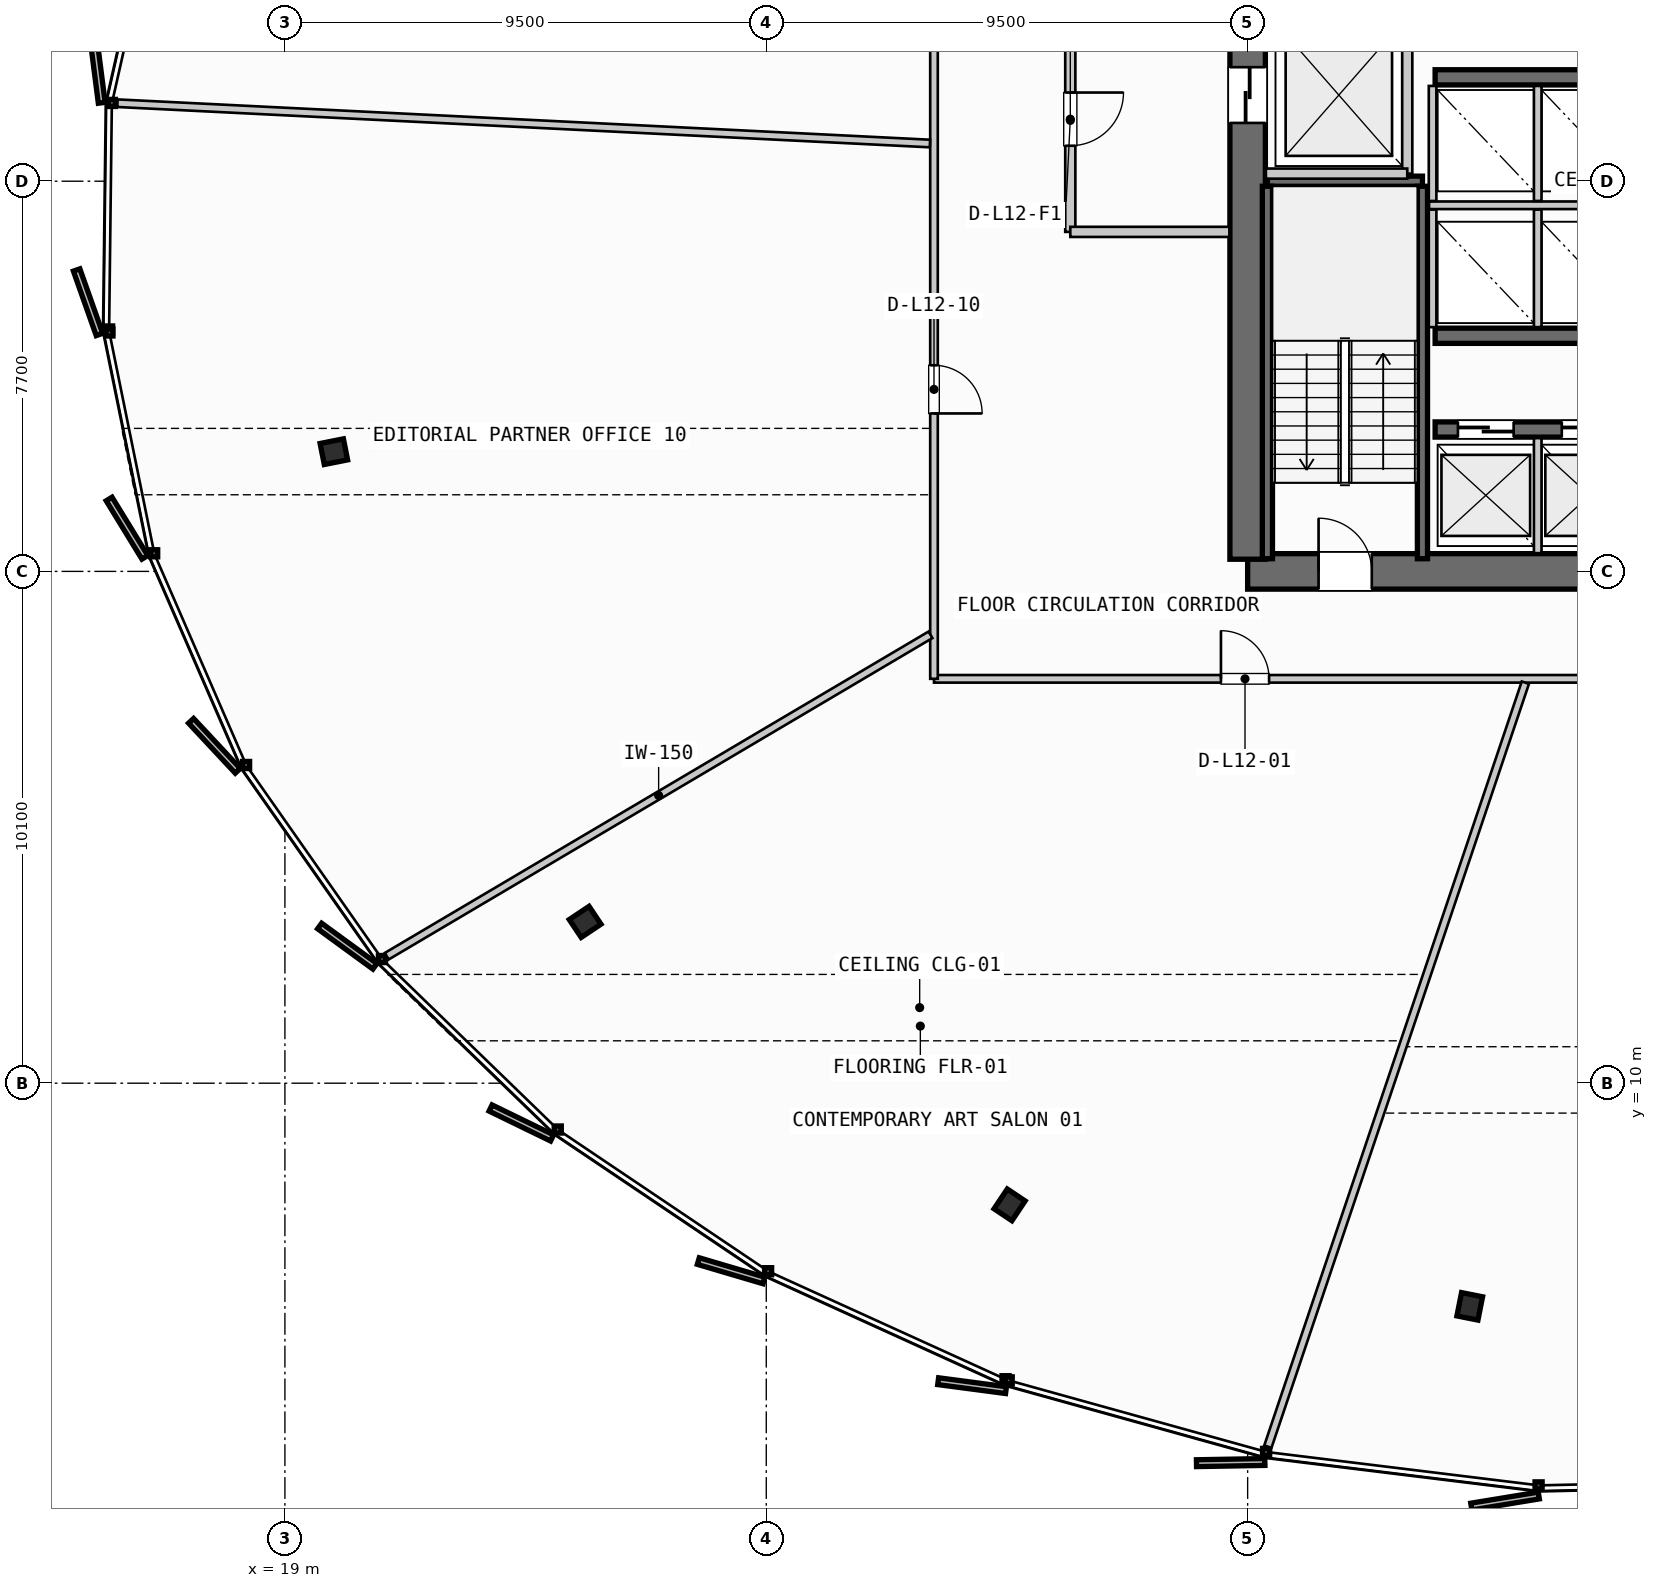
"""IFC4 building model, lengths in metres.
Left out: names, types, materials, properties, quantities, classifications, styles, units other than length and angle.
Written with IfcOpenShell. Run it as: python <this file> out.ifc"""

import sys

from ifc_helpers import new_model, si_unit, direction, frame, frame_2d, origin, origin_2d, place, context, subcontext, project, spatial, rectangle, i_section, extrude, source, transform, mapped, element, fill, save


model = new_model("IFC4")
c1 = context("Model", 3, precision=1e-05, world=origin(), true_north=direction((0.0, 1.0)))
c2 = subcontext(c1, "Body", "Model", "MODEL_VIEW")
j1 = project(units=[si_unit("LENGTHUNIT", "METRE"), si_unit("PLANEANGLEUNIT", "RADIAN")], contexts=[c1])
p1 = place(None, origin())
s1 = spatial("IfcSite", under=j1, at=p1, CompositionType="ELEMENT")
p2 = place(p1, origin())
s2 = spatial("IfcBuilding", under=s1, at=p2, CompositionType="ELEMENT")
p3 = place(p2, frame((0.0, 0.0, 52.4)))
s3 = spatial("IfcBuildingStorey", under=s2, at=p3, CompositionType="ELEMENT", Elevation=52.4)
p4 = place(p3, frame((38.0, 20.1, 0.0), z_axis=(0.0, 0.0, 1.0), x_axis=(1.0, 0.0, 0.0)))
e1 = element("IfcWall", 1, at=p4, inside=s3, PredefinedType="SHEAR", context=c2, shape_type="SweptSolid", body=[
    extrude(rectangle(XDim=17.6, YDim=0.7, at=frame_2d((8.8, 0.0))), origin(), (0.0, 0.0, 1.0), 3.55),
])
p5 = place(p4, frame((1.4, 0.0, 0.0)))
e2 = element("IfcOpeningElement", 2, at=p5, cuts=e1, PredefinedType="OPENING", context=c2, shape_type="SweptSolid", body=[
    extrude(rectangle(XDim=1.05, YDim=2.15, at=frame_2d((0.525, 1.075))), frame((0.0, 0.36, 0.0), z_axis=(0.0, -1.0, 0.0), x_axis=(1.0, 0.0, 0.0)), (0.0, 0.0, 1.0), 0.72),
])
p6 = place(p4, frame((15.15, 0.0, 0.0)))
e3 = element("IfcOpeningElement", 3, at=p6, cuts=e1, PredefinedType="OPENING", context=c2, shape_type="SweptSolid", body=[
    extrude(rectangle(XDim=1.05, YDim=2.15, at=frame_2d((0.525, 1.075))), frame((0.0, 0.36, 0.0), z_axis=(0.0, -1.0, 0.0), x_axis=(1.0, 0.0, 0.0)), (0.0, 0.0, 1.0), 0.72),
])
p7 = place(p3, frame((38.0, 35.26, 0.0), z_axis=(0.0, 0.0, 1.0), x_axis=(0.0, -1.0, 0.0)))
e4 = element("IfcWall", 4, at=p7, inside=s3, PredefinedType="SHEAR", context=c2, shape_type="SweptSolid", body=[
    extrude(rectangle(XDim=14.92, YDim=0.7, at=frame_2d((7.46, 0.0))), origin(), (0.0, 0.0, 1.0), 3.55),
])
p8 = place(p7, frame((5.21, 0.0, 0.0)))
e5 = element("IfcOpeningElement", 5, at=p8, cuts=e4, PredefinedType="OPENING", context=c2, shape_type="SweptSolid", body=[
    extrude(rectangle(XDim=1.1, YDim=2.2, at=frame_2d((0.55, 1.1))), frame((0.0, 0.36, 0.0), z_axis=(0.0, -1.0, 0.0), x_axis=(1.0, 0.0, 0.0)), (0.0, 0.0, 1.0), 0.72),
])
p9 = place(p3, frame((41.7, 22.9, 0.0), z_axis=(0.0, 0.0, 1.0), x_axis=(1.0, 0.0, 0.0)))
e6 = element("IfcWall", 6, at=p9, inside=s3, PredefinedType="SHEAR", context=c2, shape_type="SweptSolid", body=[
    extrude(rectangle(XDim=4.25, YDim=0.3, at=frame_2d((2.125, 0.0))), origin(), (0.0, 0.0, 1.0), 3.55),
])
p10 = place(p9, frame((0.45, 0.0, 0.0)))
e7 = element("IfcOpeningElement", 7, at=p10, cuts=e6, PredefinedType="OPENING", context=c2, shape_type="SweptSolid", body=[
    extrude(rectangle(XDim=1.1, YDim=2.2, at=frame_2d((0.55, 1.1))), frame((0.0, 0.16, 0.0), z_axis=(0.0, -1.0, 0.0), x_axis=(1.0, 0.0, 0.0)), (0.0, 0.0, 1.0), 0.32),
])
p11 = place(p9, frame((2.5, 0.0, 0.0)))
e8 = element("IfcOpeningElement", 8, at=p11, cuts=e6, PredefinedType="OPENING", context=c2, shape_type="SweptSolid", body=[
    extrude(rectangle(XDim=1.1, YDim=2.2, at=frame_2d((0.55, 1.1))), frame((0.0, 0.16, 0.0), z_axis=(0.0, -1.0, 0.0), x_axis=(1.0, 0.0, 0.0)), (0.0, 0.0, 1.0), 0.32),
])
for number, where, z_axis, x_axis in (
    (9, (41.7, 24.75, 0.0), (0.0, 0.0, 1.0), (1.0, 0.0, 0.0)),
    (10, (41.7, 29.85, 0.0), (0.0, 0.0, 1.0), (1.0, 0.0, 0.0)),
):
    element("IfcWall", number, at=place(p3, frame(where, z_axis=z_axis, x_axis=x_axis)), inside=s3, PredefinedType="SHEAR", context=c2, shape_type="SweptSolid", body=[
        extrude(rectangle(XDim=4.25, YDim=0.3, at=frame_2d((2.125, 0.0))), origin(), (0.0, 0.0, 1.0), 3.55),
    ])
m1 = source(origin(), c2, "Body", "SweptSolid", [
    extrude(i_section(OverallWidth=0.423, OverallDepth=0.469, WebThickness=0.051, FlangeThickness=0.081, FilletRadius=0.015, at=origin_2d()), origin(), (0.0, 0.0, 1.0), 3.55),
])
for number, where, z_axis, x_axis in (
    (11, (19.966, 22.462, 0.0), (0.0, 0.0, 1.0), (-0.981, -0.195, 0.0)),
    (12, (24.925, 13.183, 0.0), (0.0, 0.0, 1.0), (-0.831, -0.556, 0.0)),
    (13, (33.302, 7.599, 0.0), (0.0, 0.0, 1.0), (-0.556, -0.831, 0.0)),
    (14, (42.383, 5.596, 0.0), (0.0, 0.0, 1.0), (-0.195, -0.981, 0.0)),
):
    element("IfcColumn", number, at=place(p3, frame(where, z_axis=z_axis, x_axis=x_axis)), inside=s3, PredefinedType="COLUMN", context=c2, shape_type="MappedRepresentation", body=[
        mapped(m1, transform((0.0, 0.0, 0.0), scale=1.0)),
    ])
p12 = place(p3, frame((38.39, 27.8, 0.0), z_axis=(0.0, 0.0, 1.0), x_axis=(1.0, 0.0, 0.0)))
e15 = element("IfcWall", 15, at=p12, inside=s3, PredefinedType="SHEAR", context=c2, shape_type="SweptSolid", body=[
    extrude(rectangle(XDim=3.06, YDim=0.2, at=frame_2d((1.53, 0.0))), origin(), (0.0, 0.0, 1.0), 3.55),
])
for number, where, z_axis, x_axis in (
    (16, (41.45, 27.7, 0.0), (0.0, 0.0, 1.0), (0.0, -1.0, 0.0)),
    (17, (38.39, 20.35, 0.0), (0.0, 0.0, 1.0), (0.0, 1.0, 0.0)),
):
    element("IfcWall", number, at=place(p3, frame(where, z_axis=z_axis, x_axis=x_axis)), inside=s3, PredefinedType="SHEAR", context=c2, shape_type="SweptSolid", body=[
        extrude(rectangle(XDim=7.35, YDim=0.2, at=frame_2d((3.675, 0.0))), origin(), (0.0, 0.0, 1.0), 3.55),
    ])
p13 = place(p3, frame((41.15, 27.95, 0.0), z_axis=(0.0, 0.0, 1.0), x_axis=(0.0, 1.0, 0.0)))
e18 = element("IfcWall", 18, at=p13, inside=s3, PredefinedType="PARTITIONING", context=c2, shape_type="SweptSolid", body=[
    extrude(rectangle(XDim=3.1, YDim=0.2, at=frame_2d((1.55, 0.0))), origin(), (0.0, 0.0, 1.0), 2.645),
])
p14 = place(p3, frame((38.36, 27.95, 0.0), z_axis=(0.0, 0.0, 1.0), x_axis=(1.0, 0.0, 0.0)))
e19 = element("IfcWall", 19, at=p14, inside=s3, PredefinedType="PARTITIONING", context=c2, shape_type="SweptSolid", body=[
    extrude(rectangle(XDim=2.79, YDim=0.2, at=frame_2d((1.395, 0.0))), origin(), (0.0, 0.0, 1.0), 2.645),
])
p15 = place(p3, frame((34.5, 31.2, 0.0), z_axis=(0.0, 0.0, 1.0), x_axis=(0.0, -1.0, 0.0)))
e20 = element("IfcWall", 20, at=p15, inside=s3, PredefinedType="PARTITIONING", context=c2, shape_type="SweptSolid", body=[
    extrude(rectangle(XDim=4.4, YDim=0.2, at=frame_2d((2.2, 0.0))), origin(), (0.0, 0.0, 1.0), 2.645),
])
p16 = place(p15, frame((1.65, 0.0, 0.0)))
e21 = element("IfcOpeningElement", 21, at=p16, cuts=e20, PredefinedType="OPENING", context=c2, shape_type="SweptSolid", body=[
    extrude(rectangle(XDim=1.05, YDim=2.15, at=frame_2d((0.525, 1.075))), frame((0.0, 0.11, 0.0), z_axis=(0.0, -1.0, 0.0), x_axis=(1.0, 0.0, 0.0)), (0.0, 0.0, 1.0), 0.22),
])
p17 = place(p3, frame((34.5, 26.8, 0.0), z_axis=(0.0, 0.0, 1.0), x_axis=(1.0, 0.0, 0.0)))
e22 = element("IfcWall", 22, at=p17, inside=s3, PredefinedType="PARTITIONING", context=c2, shape_type="SweptSolid", body=[
    extrude(rectangle(XDim=3.14, YDim=0.2, at=frame_2d((1.57, 0.0))), origin(), (0.0, 0.0, 1.0), 2.645),
])
p18 = place(p3, frame((43.725, 20.46, 0.0), z_axis=(0.0, 0.0, 1.0), x_axis=(0.0, 1.0, 0.0)))
e23 = element("IfcWall", 23, at=p18, inside=s3, PredefinedType="PARTITIONING", context=c2, shape_type="SweptSolid", body=[
    extrude(rectangle(XDim=2.27, YDim=0.15, at=frame_2d((1.135, 0.0))), origin(), (0.0, 0.0, 1.0), 2.645),
])
p19 = place(p3, frame((41.58, 27.325, 0.0), z_axis=(0.0, 0.0, 1.0), x_axis=(1.0, 0.0, 0.0)))
e24 = element("IfcWall", 24, at=p19, inside=s3, PredefinedType="PARTITIONING", context=c2, shape_type="SweptSolid", body=[
    extrude(rectangle(XDim=4.32, YDim=0.15, at=frame_2d((2.16, 0.0))), origin(), (0.0, 0.0, 1.0), 2.645),
])
for number, where, z_axis, x_axis in (
    (25, (41.65, 24.92, 0.0), (0.0, 0.0, 1.0), (0.0, 1.0, 0.0)),
    (26, (43.725, 24.92, 0.0), (0.0, 0.0, 1.0), (0.0, 1.0, 0.0)),
):
    element("IfcWall", number, at=place(p3, frame(where, z_axis=z_axis, x_axis=x_axis)), inside=s3, PredefinedType="PARTITIONING", context=c2, shape_type="SweptSolid", body=[
        extrude(rectangle(XDim=2.32, YDim=0.15, at=frame_2d((1.16, 0.0))), origin(), (0.0, 0.0, 1.0), 2.645),
    ])
for number, where, z_axis, x_axis in (
    (27, (41.65, 27.41, 0.0), (0.0, 0.0, 1.0), (0.0, 1.0, 0.0)),
    (28, (43.725, 27.41, 0.0), (0.0, 0.0, 1.0), (0.0, 1.0, 0.0)),
):
    element("IfcWall", number, at=place(p3, frame(where, z_axis=z_axis, x_axis=x_axis)), inside=s3, PredefinedType="PARTITIONING", context=c2, shape_type="SweptSolid", body=[
        extrude(rectangle(XDim=2.27, YDim=0.15, at=frame_2d((1.135, 0.0))), origin(), (0.0, 0.0, 1.0), 2.645),
    ])
p20 = place(p3, frame((31.81, 17.98, 0.0), z_axis=(0.0, 0.0, 1.0), x_axis=(1.0, 0.0, 0.0)))
e29 = element("IfcWall", 29, at=p20, inside=s3, PredefinedType="PARTITIONING", context=c2, shape_type="SweptSolid", body=[
    extrude(rectangle(XDim=29.98, YDim=0.15, at=frame_2d((14.99, 0.0))), origin(), (0.0, 0.0, 1.0), 2.645),
])
p21 = place(p20, frame((5.663, 0.0, 0.0)))
e30 = element("IfcOpeningElement", 30, at=p21, cuts=e29, PredefinedType="OPENING", context=c2, shape_type="SweptSolid", body=[
    extrude(rectangle(XDim=0.95, YDim=2.15, at=frame_2d((0.475, 1.075))), frame((0.0, 0.085, 0.0), z_axis=(0.0, -1.0, 0.0), x_axis=(1.0, 0.0, 0.0)), (0.0, 0.0, 1.0), 0.17),
])
p22 = place(p20, frame((19.24, 0.0, 0.0)))
e31 = element("IfcOpeningElement", 31, at=p22, cuts=e29, PredefinedType="OPENING", context=c2, shape_type="SweptSolid", body=[
    extrude(rectangle(XDim=0.95, YDim=2.15, at=frame_2d((0.475, 1.075))), frame((0.0, 0.085, 0.0), z_axis=(0.0, -1.0, 0.0), x_axis=(1.0, 0.0, 0.0)), (0.0, 0.0, 1.0), 0.17),
])
p23 = place(p3, frame((31.81, 37.2, 0.0), z_axis=(0.0, 0.0, 1.0), x_axis=(0.0, -1.0, 0.0)))
e32 = element("IfcWall", 32, at=p23, inside=s3, PredefinedType="PARTITIONING", context=c2, shape_type="SweptSolid", body=[
    extrude(rectangle(XDim=19.22, YDim=0.15, at=frame_2d((9.61, 0.0))), origin(), (0.0, 0.0, 1.0), 2.645),
])
p24 = place(p23, frame((4.359, 0.0, 0.0)))
e33 = element("IfcOpeningElement", 33, at=p24, cuts=e32, PredefinedType="OPENING", context=c2, shape_type="SweptSolid", body=[
    extrude(rectangle(XDim=0.95, YDim=2.15, at=frame_2d((0.475, 1.075))), frame((0.0, 0.085, 0.0), z_axis=(0.0, -1.0, 0.0), x_axis=(1.0, 0.0, 0.0)), (0.0, 0.0, 1.0), 0.17),
])
p25 = place(p23, frame((13.033, 0.0, 0.0)))
e34 = element("IfcOpeningElement", 34, at=p25, cuts=e32, PredefinedType="OPENING", context=c2, shape_type="SweptSolid", body=[
    extrude(rectangle(XDim=0.95, YDim=2.15, at=frame_2d((0.475, 1.075))), frame((0.0, 0.085, 0.0), z_axis=(0.0, -1.0, 0.0), x_axis=(1.0, 0.0, 0.0)), (0.0, 0.0, 1.0), 0.17),
])
p26 = place(p3, frame((31.741, 18.849, 0.0), z_axis=(0.0, 0.0, 1.0), x_axis=(-0.860869986588, -0.508824985817, 0.0)))
e35 = element("IfcWall", 35, at=p26, inside=s3, PredefinedType="PARTITIONING", context=c2, shape_type="SweptSolid", body=[
    extrude(rectangle(XDim=12.466, YDim=0.15, at=frame_2d((6.233, 0.0))), origin(), (0.0, 0.0, 1.0), 2.645),
])
p27 = place(p3, frame((43.481, 17.904, 0.0), z_axis=(0.0, 0.0, 1.0), x_axis=(-0.319393235536, -0.947622267095, 0.0)))
e36 = element("IfcWall", 36, at=p27, inside=s3, PredefinedType="PARTITIONING", context=c2, shape_type="SweptSolid", body=[
    extrude(rectangle(XDim=15.91, YDim=0.15, at=frame_2d((7.955, 0.0))), origin(), (0.0, 0.0, 1.0), 2.645),
])
p28 = place(p3, frame((31.73, 28.544, 0.0), z_axis=(0.0, 0.0, 1.0), x_axis=(-0.998771265113, 0.049557643048, 0.0)))
e37 = element("IfcWall", 37, at=p28, inside=s3, PredefinedType="PARTITIONING", context=c2, shape_type="SweptSolid", body=[
    extrude(rectangle(XDim=16.055, YDim=0.15, at=frame_2d((8.028, 0.0))), origin(), (0.0, 0.0, 1.0), 2.645),
])
m2 = source(origin(), c2, "Body", "SweptSolid", [
    extrude(rectangle(XDim=1.05, YDim=2.15, at=frame_2d((0.525, 1.075))), frame((0.0, 0.025, 0.0), z_axis=(0.0, -1.0, 0.0), x_axis=(1.0, 0.0, 0.0)), (0.0, 0.0, 1.0), 0.05),
])
p29 = place(p5, origin())
e38 = element("IfcDoor", 38, at=p29, inside=s3, OperationType="SINGLE_SWING_LEFT", PredefinedType="DOOR", context=c2, shape_type="MappedRepresentation", body=[
    mapped(m2, transform((0.0, 0.0, 0.0), scale=1.0)),
])
fill(e2, e38)
m3 = source(origin(), c2, "Body", "SweptSolid", [
    extrude(rectangle(XDim=1.1, YDim=2.2, at=frame_2d((0.55, 1.1))), frame((0.0, 0.025, 0.0), z_axis=(0.0, -1.0, 0.0), x_axis=(1.0, 0.0, 0.0)), (0.0, 0.0, 1.0), 0.05),
])
p30 = place(p8, origin())
e39 = element("IfcDoor", 39, at=p30, inside=s3, OperationType="SLIDING_TO_LEFT", PredefinedType="DOOR", context=c2, shape_type="MappedRepresentation", body=[
    mapped(m3, transform((0.0, 0.0, 0.0), scale=1.0)),
])
fill(e5, e39)
p31 = place(p10, origin())
e40 = element("IfcDoor", 40, at=p31, inside=s3, OperationType="SLIDING_TO_LEFT", PredefinedType="DOOR", context=c2, shape_type="MappedRepresentation", body=[
    mapped(m3, transform((0.0, 0.0, 0.0), scale=1.0)),
])
fill(e7, e40)
p32 = place(p11, origin())
e41 = element("IfcDoor", 41, at=p32, inside=s3, OperationType="SLIDING_TO_LEFT", PredefinedType="DOOR", context=c2, shape_type="MappedRepresentation", body=[
    mapped(m3, transform((0.0, 0.0, 0.0), scale=1.0)),
])
fill(e8, e41)
p33 = place(p16, origin())
e42 = element("IfcDoor", 42, at=p33, inside=s3, OperationType="SINGLE_SWING_LEFT", PredefinedType="DOOR", context=c2, shape_type="MappedRepresentation", body=[
    mapped(m2, transform((0.0, 0.0, 0.0), scale=1.0)),
])
fill(e21, e42)
m4 = source(origin(), c2, "Body", "SweptSolid", [
    extrude(rectangle(XDim=0.95, YDim=2.15, at=frame_2d((0.475, 1.075))), frame((0.0, 0.025, 0.0), z_axis=(0.0, -1.0, 0.0), x_axis=(1.0, 0.0, 0.0)), (0.0, 0.0, 1.0), 0.05),
])
p34 = place(p21, origin())
e43 = element("IfcDoor", 43, at=p34, inside=s3, OperationType="SINGLE_SWING_LEFT", PredefinedType="DOOR", context=c2, shape_type="MappedRepresentation", body=[
    mapped(m4, transform((0.0, 0.0, 0.0), scale=1.0)),
])
fill(e30, e43)
p35 = place(p25, origin())
e44 = element("IfcDoor", 44, at=p35, inside=s3, OperationType="SINGLE_SWING_RIGHT", PredefinedType="DOOR", context=c2, shape_type="MappedRepresentation", body=[
    mapped(m4, transform((0.0, 0.0, 0.0), scale=1.0)),
])
fill(e34, e44)
save(model, sys.argv[1])
